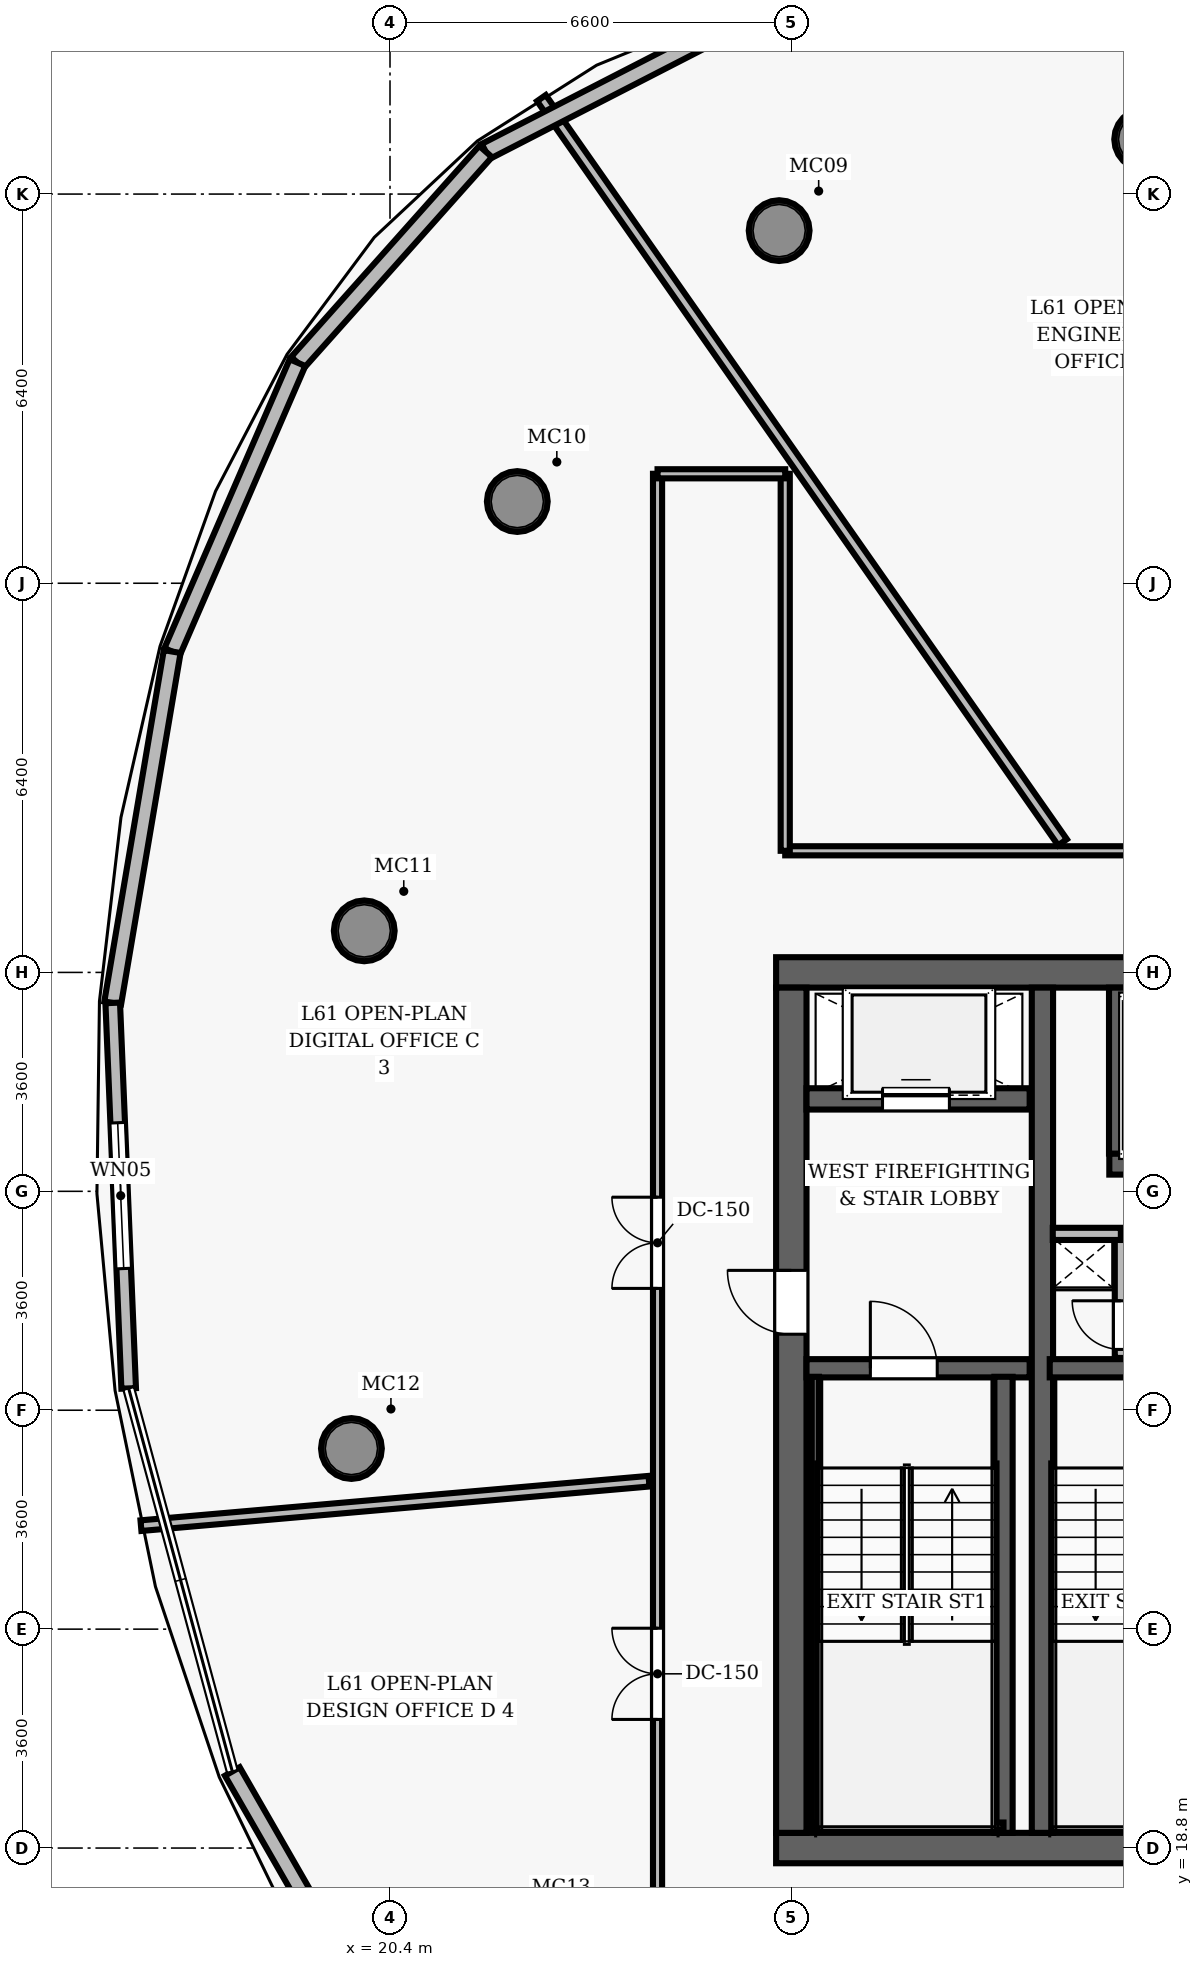
"""IFC4 building model, lengths in metres.
Left out: names, types, materials, properties, quantities, classifications, styles, units other than length and angle.
Written with IfcOpenShell. Run it as: python <this file> out.ifc"""

import sys

from ifc_helpers import new_model, si_unit, direction, frame, frame_2d, origin, origin_2d, place, context, subcontext, project, spatial, rectangle, hollow_circle, extrude, element, fill, save


model = new_model("IFC4")
c1 = context("Model", 3, precision=1e-05, world=origin(), true_north=direction((0.0, 1.0)))
c2 = subcontext(c1, "Body", "Model", "MODEL_VIEW")
j1 = project(units=[si_unit("LENGTHUNIT", "METRE"), si_unit("PLANEANGLEUNIT", "RADIAN")], contexts=[c1])
p1 = place(None, origin())
s1 = spatial("IfcSite", under=j1, at=p1, CompositionType="ELEMENT")
p2 = place(p1, origin())
s2 = spatial("IfcBuilding", under=s1, at=p2, CompositionType="ELEMENT")
p3 = place(p2, frame((0.0, 0.0, 242.05)))
s3 = spatial("IfcBuildingStorey", under=s2, at=p3, CompositionType="ELEMENT", Elevation=242.05)
p4 = place(p3, frame((26.75, 18.8, 0.0), z_axis=(0.0, 0.0, 1.0), x_axis=(1.0, 0.0, 0.0)))
e1 = element("IfcWall", 1, at=p4, inside=s3, PredefinedType="SHEAR", context=c2, shape_type="SweptSolid", body=[
    extrude(rectangle(XDim=22.5, YDim=0.5, at=frame_2d((11.25, 0.0))), origin(), (0.0, 0.0, 1.0), 3.85),
])
p5 = place(p4, frame((14.47, 0.0, 0.0)))
e2 = element("IfcOpeningElement", 2, at=p5, cuts=e1, PredefinedType="OPENING", context=c2, shape_type="SweptSolid", body=[
    extrude(rectangle(XDim=1.05, YDim=2.15, at=frame_2d((0.525, 1.075))), frame((0.0, 0.26, 0.0), z_axis=(0.0, -1.0, 0.0), x_axis=(1.0, 0.0, 0.0)), (0.0, 0.0, 1.0), 0.52),
])
p6 = place(p3, frame((26.75, 33.2, 0.0), z_axis=(0.0, 0.0, 1.0), x_axis=(1.0, 0.0, 0.0)))
e3 = element("IfcWall", 3, at=p6, inside=s3, PredefinedType="SHEAR", context=c2, shape_type="SweptSolid", body=[
    extrude(rectangle(XDim=22.5, YDim=0.5, at=frame_2d((11.25, 0.0))), origin(), (0.0, 0.0, 1.0), 3.85),
])
p7 = place(p3, frame((27.0, 19.05, 0.0), z_axis=(0.0, 0.0, 1.0), x_axis=(0.0, 1.0, 0.0)))
e4 = element("IfcWall", 4, at=p7, inside=s3, PredefinedType="SHEAR", context=c2, shape_type="SweptSolid", body=[
    extrude(rectangle(XDim=13.9, YDim=0.5, at=frame_2d((6.95, 0.0))), origin(), (0.0, 0.0, 1.0), 3.85),
])
p8 = place(p7, frame((8.2, 0.0, 0.0)))
e5 = element("IfcOpeningElement", 5, at=p8, cuts=e4, PredefinedType="OPENING", context=c2, shape_type="SweptSolid", body=[
    extrude(rectangle(XDim=1.05, YDim=2.15, at=frame_2d((0.525, 1.075))), frame((0.0, 0.26, 0.0), z_axis=(0.0, -1.0, 0.0), x_axis=(1.0, 0.0, 0.0)), (0.0, 0.0, 1.0), 0.52),
])
p9 = place(p3, frame((31.13, 19.05, 0.0), z_axis=(0.0, 0.0, 1.0), x_axis=(0.0, 1.0, 0.0)))
e6 = element("IfcWall", 6, at=p9, inside=s3, PredefinedType="SHEAR", context=c2, shape_type="SweptSolid", body=[
    extrude(rectangle(XDim=13.9, YDim=0.35, at=frame_2d((6.95, 0.0))), origin(), (0.0, 0.0, 1.0), 3.85),
])
for number, where, z_axis, x_axis in (
    (7, (32.812, 46.901, 0.0), (0.0, 0.0, 1.0), (1.0, 0.0, 0.0)),
    (8, (26.8, 45.399, 0.0), (0.0, 0.0, 1.0), (1.0, 0.0, 0.0)),
    (9, (22.494, 40.944, 0.0), (0.0, 0.0, 1.0), (1.0, 0.0, 0.0)),
    (10, (19.976, 33.884, 0.0), (0.0, 0.0, 1.0), (1.0, 0.0, 0.0)),
    (11, (19.765, 25.371, 0.0), (0.0, 0.0, 1.0), (1.0, 0.0, 0.0)),
):
    element("IfcColumn", number, at=place(p3, frame(where, z_axis=z_axis, x_axis=x_axis)), inside=s3, PredefinedType="COLUMN", context=c2, shape_type="SweptSolid", body=[
        extrude(hollow_circle(Radius=0.5, WallThickness=0.045, at=origin_2d()), origin(), (0.0, 0.0, 1.0), 3.85),
    ])
p10 = place(p3, frame((27.25, 26.69, 0.0), z_axis=(0.0, 0.0, 1.0), x_axis=(1.0, 0.0, 0.0)))
e12 = element("IfcWall", 12, at=p10, inside=s3, PredefinedType="SHEAR", context=c2, shape_type="SweptSolid", body=[
    extrude(rectangle(XDim=3.67, YDim=0.3, at=frame_2d((1.835, 0.0))), origin(), (0.0, 0.0, 1.0), 3.85),
])
p11 = place(p10, frame((1.05, 0.0, 0.0)))
e13 = element("IfcOpeningElement", 13, at=p11, cuts=e12, PredefinedType="OPENING", context=c2, shape_type="SweptSolid", body=[
    extrude(rectangle(XDim=1.1, YDim=2.15, at=frame_2d((0.55, 1.075))), frame((0.0, 0.16, 0.0), z_axis=(0.0, -1.0, 0.0), x_axis=(1.0, 0.0, 0.0)), (0.0, 0.0, 1.0), 0.32),
])
p12 = place(p3, frame((30.49, 19.05, 0.0), z_axis=(0.0, 0.0, 1.0), x_axis=(0.0, 1.0, 0.0)))
e14 = element("IfcWall", 14, at=p12, inside=s3, PredefinedType="SHEAR", context=c2, shape_type="SweptSolid", body=[
    extrude(rectangle(XDim=7.5, YDim=0.3, at=frame_2d((3.75, 0.0))), origin(), (0.0, 0.0, 1.0), 3.85),
])
p13 = place(p3, frame((27.395, 19.1, 0.0), z_axis=(0.0, 0.0, 1.0), x_axis=(0.0, 1.0, 0.0)))
e15 = element("IfcWall", 15, at=p13, inside=s3, PredefinedType="SHEAR", context=c2, shape_type="SweptSolid", body=[
    extrude(rectangle(XDim=7.45, YDim=0.12, at=frame_2d((3.725, 0.0))), origin(), (0.0, 0.0, 1.0), 3.85),
])
p14 = place(p3, frame((27.395, 19.16, 0.0), z_axis=(0.0, 0.0, 1.0), x_axis=(1.0, 0.0, 0.0)))
e16 = element("IfcWall", 16, at=p14, inside=s3, PredefinedType="SHEAR", context=c2, shape_type="SweptSolid", body=[
    extrude(rectangle(XDim=3.095, YDim=0.12, at=frame_2d((1.547, 0.0))), origin(), (0.0, 0.0, 1.0), 3.85),
])
p15 = place(p3, frame((27.25, 31.12, 0.0), z_axis=(0.0, 0.0, 1.0), x_axis=(1.0, 0.0, 0.0)))
e17 = element("IfcWall", 17, at=p15, inside=s3, PredefinedType="SHEAR", context=c2, shape_type="SweptSolid", body=[
    extrude(rectangle(XDim=3.67, YDim=0.35, at=frame_2d((1.835, 0.0))), origin(), (0.0, 0.0, 1.0), 3.04),
])
p16 = place(p15, frame((1.25, 0.0, 0.0)))
e18 = element("IfcOpeningElement", 18, at=p16, cuts=e17, PredefinedType="OPENING", context=c2, shape_type="SweptSolid", body=[
    extrude(rectangle(XDim=1.1, YDim=2.15, at=frame_2d((0.55, 1.075))), frame((0.0, 0.185, 0.0), z_axis=(0.0, -1.0, 0.0), x_axis=(1.0, 0.0, 0.0)), (0.0, 0.0, 1.0), 0.37),
])
p17 = place(p3, frame((31.25, 26.69, 0.0), z_axis=(0.0, 0.0, 1.0), x_axis=(1.0, 0.0, 0.0)))
e19 = element("IfcWall", 19, at=p17, inside=s3, PredefinedType="SHEAR", context=c2, shape_type="SweptSolid", body=[
    extrude(rectangle(XDim=3.56, YDim=0.3, at=frame_2d((1.78, 0.0))), origin(), (0.0, 0.0, 1.0), 3.85),
])
p18 = place(p17, frame((1.55, 0.0, 0.0)))
e20 = element("IfcOpeningElement", 20, at=p18, cuts=e19, PredefinedType="OPENING", context=c2, shape_type="SweptSolid", body=[
    extrude(rectangle(XDim=1.1, YDim=2.15, at=frame_2d((0.55, 1.075))), frame((0.0, 0.16, 0.0), z_axis=(0.0, -1.0, 0.0), x_axis=(1.0, 0.0, 0.0)), (0.0, 0.0, 1.0), 0.32),
])
p19 = place(p3, frame((31.3, 19.16, 0.0), z_axis=(0.0, 0.0, 1.0), x_axis=(1.0, 0.0, 0.0)))
e21 = element("IfcWall", 21, at=p19, inside=s3, PredefinedType="SHEAR", context=c2, shape_type="SweptSolid", body=[
    extrude(rectangle(XDim=3.04, YDim=0.12, at=frame_2d((1.52, 0.0))), origin(), (0.0, 0.0, 1.0), 3.85),
])
p20 = place(p3, frame((32.23, 30.05, 0.0), z_axis=(0.0, 0.0, 1.0), x_axis=(1.0, 0.0, 0.0)))
e22 = element("IfcWall", 22, at=p20, inside=s3, PredefinedType="SHEAR", context=c2, shape_type="SweptSolid", body=[
    extrude(rectangle(XDim=2.41, YDim=0.35, at=frame_2d((1.205, 0.0))), origin(), (0.0, 0.0, 1.0), 3.04),
])
p21 = place(p20, frame((0.42, 0.0, 0.0)))
e23 = element("IfcOpeningElement", 23, at=p21, cuts=e22, PredefinedType="OPENING", context=c2, shape_type="SweptSolid", body=[
    extrude(rectangle(XDim=0.8, YDim=2.15, at=frame_2d((0.4, 1.075))), frame((0.0, 0.185, 0.0), z_axis=(0.0, -1.0, 0.0), x_axis=(1.0, 0.0, 0.0)), (0.0, 0.0, 1.0), 0.37),
])
p22 = place(p20, frame((1.42, 0.0, 0.0)))
e24 = element("IfcOpeningElement", 24, at=p22, cuts=e22, PredefinedType="OPENING", context=c2, shape_type="SweptSolid", body=[
    extrude(rectangle(XDim=0.8, YDim=2.15, at=frame_2d((0.4, 1.075))), frame((0.0, 0.185, 0.0), z_axis=(0.0, -1.0, 0.0), x_axis=(1.0, 0.0, 0.0)), (0.0, 0.0, 1.0), 0.37),
])
p23 = place(p3, frame((32.4, 30.22, 0.0), z_axis=(0.0, 0.0, 1.0), x_axis=(0.0, 1.0, 0.0)))
e25 = element("IfcWall", 25, at=p23, inside=s3, PredefinedType="SHEAR", context=c2, shape_type="SweptSolid", body=[
    extrude(rectangle(XDim=2.73, YDim=0.35, at=frame_2d((1.365, 0.0))), origin(), (0.0, 0.0, 1.0), 3.04),
])
p24 = place(p3, frame((32.42, 26.86, 0.0), z_axis=(0.0, 0.0, 1.0), x_axis=(0.0, 1.0, 0.0)))
e26 = element("IfcWall", 26, at=p24, inside=s3, PredefinedType="PARTITIONING", context=c2, shape_type="SweptSolid", body=[
    extrude(rectangle(XDim=2.04, YDim=0.2, at=frame_2d((1.02, 0.0))), origin(), (0.0, 0.0, 1.0), 3.04),
])
p25 = place(p24, frame((0.14, 0.0, 0.0)))
e27 = element("IfcOpeningElement", 27, at=p25, cuts=e26, PredefinedType="OPENING", context=c2, shape_type="SweptSolid", body=[
    extrude(rectangle(XDim=0.8, YDim=2.05, at=frame_2d((0.4, 1.025))), frame((0.0, 0.11, 0.0), z_axis=(0.0, -1.0, 0.0), x_axis=(1.0, 0.0, 0.0)), (0.0, 0.0, 1.0), 0.22),
])
p26 = place(p3, frame((31.3, 28.9, 0.0), z_axis=(0.0, 0.0, 1.0), x_axis=(1.0, 0.0, 0.0)))
e28 = element("IfcWall", 28, at=p26, inside=s3, PredefinedType="PARTITIONING", context=c2, shape_type="SweptSolid", body=[
    extrude(rectangle(XDim=1.12, YDim=0.2, at=frame_2d((0.56, 0.0))), origin(), (0.0, 0.0, 1.0), 3.04),
])
p27 = place(p3, frame((26.9, 35.2, 0.0), z_axis=(0.0, 0.0, 1.0), x_axis=(1.0, 0.0, 0.0)))
e29 = element("IfcWall", 29, at=p27, inside=s3, PredefinedType="PARTITIONING", context=c2, shape_type="SweptSolid", body=[
    extrude(rectangle(XDim=10.05, YDim=0.15, at=frame_2d((5.025, 0.0))), origin(), (0.0, 0.0, 1.0), 3.04),
])
p28 = place(p27, frame((6.409, 0.0, 0.0)))
e30 = element("IfcOpeningElement", 30, at=p28, cuts=e29, PredefinedType="OPENING", context=c2, shape_type="SweptSolid", body=[
    extrude(rectangle(XDim=1.5, YDim=2.2, at=frame_2d((0.75, 1.1))), frame((0.0, 0.085, 0.0), z_axis=(0.0, -1.0, 0.0), x_axis=(1.0, 0.0, 0.0)), (0.0, 0.0, 1.0), 0.17),
])
p29 = place(p3, frame((24.8, 11.268, 0.0), z_axis=(0.0, 0.0, 1.0), x_axis=(0.0, 1.0, 0.0)))
e31 = element("IfcWall", 31, at=p29, inside=s3, PredefinedType="PARTITIONING", context=c2, shape_type="SweptSolid", body=[
    extrude(rectangle(XDim=30.132, YDim=0.15, at=frame_2d((15.066, 0.0))), origin(), (0.0, 0.0, 1.0), 3.04),
])
p30 = place(p29, frame((16.736, 0.0, 0.0)))
e32 = element("IfcOpeningElement", 32, at=p30, cuts=e31, PredefinedType="OPENING", context=c2, shape_type="SweptSolid", body=[
    extrude(rectangle(XDim=1.5, YDim=2.2, at=frame_2d((0.75, 1.1))), frame((0.0, 0.085, 0.0), z_axis=(0.0, -1.0, 0.0), x_axis=(1.0, 0.0, 0.0)), (0.0, 0.0, 1.0), 0.17),
])
p31 = place(p29, frame((9.648, 0.0, 0.0)))
e33 = element("IfcOpeningElement", 33, at=p31, cuts=e31, PredefinedType="OPENING", context=c2, shape_type="SweptSolid", body=[
    extrude(rectangle(XDim=1.5, YDim=2.2, at=frame_2d((0.75, 1.1))), frame((0.0, 0.085, 0.0), z_axis=(0.0, -1.0, 0.0), x_axis=(1.0, 0.0, 0.0)), (0.0, 0.0, 1.0), 0.17),
])
p32 = place(p3, frame((26.9, 35.2, 0.0), z_axis=(0.0, 0.0, 1.0), x_axis=(0.0, 1.0, 0.0)))
e34 = element("IfcWall", 34, at=p32, inside=s3, PredefinedType="PARTITIONING", context=c2, shape_type="SweptSolid", body=[
    extrude(rectangle(XDim=6.2, YDim=0.15, at=frame_2d((3.1, 0.0))), origin(), (0.0, 0.0, 1.0), 3.04),
])
p33 = place(p3, frame((24.8, 41.4, 0.0), z_axis=(0.0, 0.0, 1.0), x_axis=(1.0, 0.0, 0.0)))
e35 = element("IfcWall", 35, at=p33, inside=s3, PredefinedType="PARTITIONING", context=c2, shape_type="SweptSolid", body=[
    extrude(rectangle(XDim=2.1, YDim=0.15, at=frame_2d((1.05, 0.0))), origin(), (0.0, 0.0, 1.0), 3.04),
])
p34 = place(p3, frame((31.46, 35.34, 0.0), z_axis=(0.0, 0.0, 1.0), x_axis=(-0.573590650074, 0.819142091549, 0.0)))
e36 = element("IfcWall", 36, at=p34, inside=s3, PredefinedType="PARTITIONING", context=c2, shape_type="SweptSolid", body=[
    extrude(rectangle(XDim=14.941, YDim=0.175, at=frame_2d((7.47, 0.0))), origin(), (0.0, 0.0, 1.0), 3.04),
])
p35 = place(p3, frame((24.66, 24.833, 0.0), z_axis=(0.0, 0.0, 1.0), x_axis=(-0.996192927603, -0.087175977156, 0.0)))
e37 = element("IfcWall", 37, at=p35, inside=s3, PredefinedType="PARTITIONING", context=c2, shape_type="SweptSolid", body=[
    extrude(rectangle(XDim=8.388, YDim=0.175, at=frame_2d((4.194, 0.0))), origin(), (0.0, 0.0, 1.0), 3.04),
])
p36 = place(p3, frame((21.972, 46.7, 0.0), z_axis=(0.0, 0.0, 1.0), x_axis=(0.889373798751, 0.457180758666, 0.0)))
e38 = element("IfcWall", 38, at=p36, inside=s3, PredefinedType="SOLIDWALL", context=c2, shape_type="SweptSolid", body=[
    extrude(rectangle(XDim=4.651, YDim=0.28, at=frame_2d((2.325, 0.0))), origin(), (0.0, 0.0, 1.0), 3.625),
])
p37 = place(p3, frame((18.878, 43.228, 0.0), z_axis=(0.0, 0.0, 1.0), x_axis=(0.665305013969, 0.746571656566, 0.0)))
e39 = element("IfcWall", 39, at=p37, inside=s3, PredefinedType="SOLIDWALL", context=c2, shape_type="SweptSolid", body=[
    extrude(rectangle(XDim=4.65, YDim=0.28, at=frame_2d((2.325, 0.0))), origin(), (0.0, 0.0, 1.0), 3.625),
])
p38 = place(p3, frame((16.818, 38.477, 0.0), z_axis=(0.0, 0.0, 1.0), x_axis=(0.397846863497, 0.917451836995, 0.0)))
e40 = element("IfcWall", 40, at=p38, inside=s3, PredefinedType="SOLIDWALL", context=c2, shape_type="SweptSolid", body=[
    extrude(rectangle(XDim=5.179, YDim=0.28, at=frame_2d((2.59, 0.0))), origin(), (0.0, 0.0, 1.0), 3.625),
])
p39 = place(p3, frame((15.84, 32.699, 0.0), z_axis=(0.0, 0.0, 1.0), x_axis=(0.166898182557, 0.985974135898, 0.0)))
e41 = element("IfcWall", 41, at=p39, inside=s3, PredefinedType="SOLIDWALL", context=c2, shape_type="SweptSolid", body=[
    extrude(rectangle(XDim=5.86, YDim=0.28, at=frame_2d((2.93, 0.0))), origin(), (0.0, 0.0, 1.0), 3.625),
])
p40 = place(p3, frame((16.102, 26.359, 0.0), z_axis=(0.0, 0.0, 1.0), x_axis=(-0.041400088191, 0.999142648823, 0.0)))
e42 = element("IfcWall", 42, at=p40, inside=s3, PredefinedType="SOLIDWALL", context=c2, shape_type="SweptSolid", body=[
    extrude(rectangle(XDim=6.345, YDim=0.24, at=frame_2d((3.173, 0.0))), origin(), (0.0, 0.0, 1.0), 3.625),
])
p41 = place(p40, frame((1.973, 0.0, 0.85)))
e43 = element("IfcOpeningElement", 43, at=p41, cuts=e42, PredefinedType="OPENING", context=c2, shape_type="SweptSolid", body=[
    extrude(rectangle(XDim=2.4, YDim=2.0, at=frame_2d((1.2, 1.0))), frame((0.0, 0.13, 0.0), z_axis=(0.0, -1.0, 0.0), x_axis=(1.0, 0.0, 0.0)), (0.0, 0.0, 1.0), 0.26),
])
p42 = place(p3, frame((21.058, 14.399, 0.0), z_axis=(0.0, 0.0, 1.0), x_axis=(-0.498043079681, 0.867152288114, 0.0)))
e44 = element("IfcWall", 44, at=p42, inside=s3, PredefinedType="SOLIDWALL", context=c2, shape_type="SweptSolid", body=[
    extrude(rectangle(XDim=6.527, YDim=0.28, at=frame_2d((3.264, 0.0))), origin(), (0.0, 0.0, 1.0), 3.625),
])
p43 = place(p11, origin())
e45 = element("IfcDoor", 45, at=p43, inside=s3, OperationType="SINGLE_SWING_LEFT", PredefinedType="DOOR", context=c2, shape_type="SweptSolid", body=[
    extrude(rectangle(XDim=1.1, YDim=2.15, at=frame_2d((0.55, 1.075))), frame((0.0, 0.025, 0.0), z_axis=(0.0, -1.0, 0.0), x_axis=(1.0, 0.0, 0.0)), (0.0, 0.0, 1.0), 0.05),
])
fill(e13, e45)
p44 = place(p8, origin())
e46 = element("IfcDoor", 46, at=p44, inside=s3, OperationType="SINGLE_SWING_RIGHT", PredefinedType="DOOR", context=c2, shape_type="SweptSolid", body=[
    extrude(rectangle(XDim=1.05, YDim=2.15, at=frame_2d((0.525, 1.075))), frame((0.0, 0.025, 0.0), z_axis=(0.0, -1.0, 0.0), x_axis=(1.0, 0.0, 0.0)), (0.0, 0.0, 1.0), 0.05),
])
fill(e5, e46)
p45 = place(p25, origin())
e47 = element("IfcDoor", 47, at=p45, inside=s3, OperationType="SINGLE_SWING_RIGHT", PredefinedType="DOOR", context=c2, shape_type="SweptSolid", body=[
    extrude(rectangle(XDim=0.8, YDim=2.05, at=frame_2d((0.4, 1.025))), frame((0.0, 0.025, 0.0), z_axis=(0.0, -1.0, 0.0), x_axis=(1.0, 0.0, 0.0)), (0.0, 0.0, 1.0), 0.05),
])
fill(e27, e47)
p46 = place(p30, origin())
e48 = element("IfcDoor", 48, at=p46, inside=s3, OperationType="DOUBLE_DOOR_SINGLE_SWING", PredefinedType="DOOR", context=c2, shape_type="SweptSolid", body=[
    extrude(rectangle(XDim=1.5, YDim=2.2, at=frame_2d((0.75, 1.1))), frame((0.0, 0.025, 0.0), z_axis=(0.0, -1.0, 0.0), x_axis=(1.0, 0.0, 0.0)), (0.0, 0.0, 1.0), 0.05),
])
fill(e32, e48)
p47 = place(p31, origin())
e49 = element("IfcDoor", 49, at=p47, inside=s3, OperationType="DOUBLE_DOOR_SINGLE_SWING", PredefinedType="DOOR", context=c2, shape_type="SweptSolid", body=[
    extrude(rectangle(XDim=1.5, YDim=2.2, at=frame_2d((0.75, 1.1))), frame((0.0, 0.025, 0.0), z_axis=(0.0, -1.0, 0.0), x_axis=(1.0, 0.0, 0.0)), (0.0, 0.0, 1.0), 0.05),
])
fill(e33, e49)
p48 = place(p16, origin())
e50 = element("IfcDoor", 50, at=p48, inside=s3, OperationType="SLIDING_TO_LEFT", PredefinedType="DOOR", context=c2, shape_type="SweptSolid", body=[
    extrude(rectangle(XDim=1.1, YDim=2.15, at=frame_2d((0.55, 1.075))), frame((0.0, 0.025, 0.0), z_axis=(0.0, -1.0, 0.0), x_axis=(1.0, 0.0, 0.0)), (0.0, 0.0, 1.0), 0.05),
])
fill(e18, e50)
p49 = place(p41, origin())
e51 = element("IfcWindow", 51, at=p49, inside=s3, PartitioningType="SINGLE_PANEL", PredefinedType="WINDOW", context=c2, shape_type="SweptSolid", body=[
    extrude(rectangle(XDim=2.4, YDim=2.0, at=frame_2d((1.2, 1.0))), frame((0.0, 0.03, 0.0), z_axis=(0.0, -1.0, 0.0), x_axis=(1.0, 0.0, 0.0)), (0.0, 0.0, 1.0), 0.06),
])
fill(e43, e51)
save(model, sys.argv[1])
